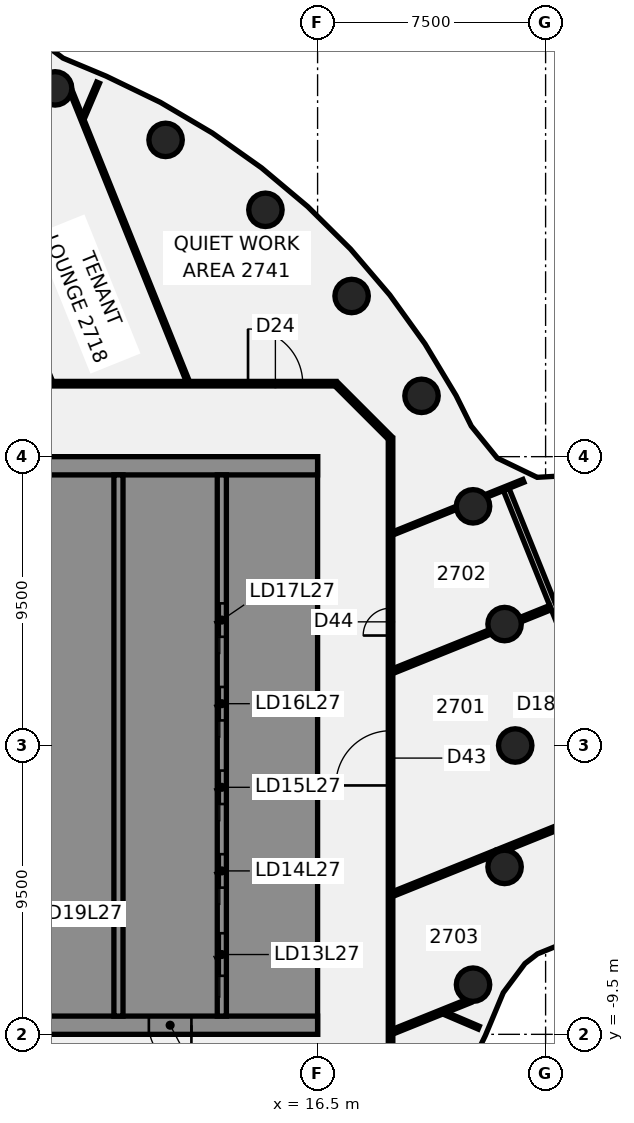
"""IFC4 building model, lengths in metres.
Left out: names, types, materials, properties, quantities, classifications, styles, units other than length and angle.
Written with IfcOpenShell. Run it as: python <this file> out.ifc"""

import sys

from ifc_helpers import new_model, si_unit, direction, frame, frame_2d, origin, origin_2d, place, context, subcontext, project, spatial, polyline, rectangle, circle, outline, extrude, element, fill, save


model = new_model("IFC4")
c1 = context("Model", 3, precision=1e-05, world=origin(), true_north=direction((0.0, 1.0)))
c2 = subcontext(c1, "Body", "Model", "MODEL_VIEW")
j1 = project(units=[si_unit("LENGTHUNIT", "METRE"), si_unit("PLANEANGLEUNIT", "RADIAN")], contexts=[c1])
p1 = place(None, origin())
s1 = spatial("IfcSite", under=j1, at=p1, CompositionType="ELEMENT")
p2 = place(p1, origin())
s2 = spatial("IfcBuilding", under=s1, at=p2, CompositionType="ELEMENT")
p3 = place(p2, frame((0.0, 0.0, 113.5)))
s3 = spatial("IfcBuildingStorey", under=s2, at=p3, CompositionType="ELEMENT", Elevation=113.5)
for number, where, z_axis, x_axis in (
    (1, (23.0, 0.0, -0.14), (0.0, 0.0, 1.0), (1.0, 0.0, 0.0)),
    (2, (22.651, 3.994, -0.14), (0.0, 0.0, 1.0), (1.0, 0.0, 0.0)),
    (3, (21.613, 7.866, -0.14), (0.0, 0.0, 1.0), (1.0, 0.0, 0.0)),
    (4, (19.919, 11.5, -0.14), (0.0, 0.0, 1.0), (1.0, 0.0, 0.0)),
    (5, (17.619, 14.784, -0.14), (0.0, 0.0, 1.0), (1.0, 0.0, 0.0)),
    (6, (14.784, 17.619, -0.14), (0.0, 0.0, 1.0), (1.0, 0.0, 0.0)),
    (7, (11.5, 19.919, -0.14), (0.0, 0.0, 1.0), (1.0, 0.0, 0.0)),
    (8, (7.866, 21.613, -0.14), (0.0, 0.0, 1.0), (1.0, 0.0, 0.0)),
    (9, (21.613, -7.866, -0.14), (0.0, 0.0, 1.0), (1.0, 0.0, 0.0)),
    (10, (22.651, -3.994, -0.14), (0.0, 0.0, 1.0), (1.0, 0.0, 0.0)),
):
    element("IfcColumn", number, at=place(p3, frame(where, z_axis=z_axis, x_axis=x_axis)), inside=s3, PredefinedType="COLUMN", context=c2, shape_type="SweptSolid", body=[
        extrude(circle(Radius=0.55, at=origin_2d()), origin(), (0.0, 0.0, 1.0), 3.75),
    ])
p4 = place(p3, frame((3.521, 22.358, 0.0), z_axis=(0.0, 0.0, 1.0), x_axis=(0.373640057319, -0.92757377473, 0.0)))
e11 = element("IfcWall", 11, at=p4, inside=s3, PredefinedType="PARTITIONING", context=c2, shape_type="SweptSolid", body=[
    extrude(rectangle(XDim=11.185, YDim=0.15, at=frame_2d((5.593, 0.0))), origin(), (0.0, 0.0, 1.0), 3.01),
])
p5 = place(p4, frame((3.3, 0.0, 0.0)))
e12 = element("IfcOpeningElement", 12, at=p5, cuts=e11, PredefinedType="OPENING", context=c2, shape_type="SweptSolid", body=[
    extrude(rectangle(XDim=1.8, YDim=2.1, at=frame_2d((0.9, 1.05))), frame((0.0, 0.085, 0.0), z_axis=(0.0, -1.0, 0.0), x_axis=(1.0, 0.0, 0.0)), (0.0, 0.0, 1.0), 0.17),
])
p6 = place(p3, frame((8.396, 21.498, 0.0), z_axis=(0.0, 0.0, 1.0), x_axis=(0.373673072067, -0.927560475232, 0.0)))
e13 = element("IfcWall", 13, at=p6, inside=s3, PredefinedType="PARTITIONING", context=c2, shape_type="SweptSolid", body=[
    extrude(rectangle(XDim=10.267, YDim=0.1, at=frame_2d((5.134, 0.0))), origin(), (0.0, 0.0, 1.0), 3.01),
])
p7 = place(p3, frame((22.704, 8.423, 0.0), z_axis=(0.0, 0.0, 1.0), x_axis=(0.373649542525, -0.927569953896, 0.0)))
e14 = element("IfcWall", 14, at=p7, inside=s3, PredefinedType="PARTITIONING", context=c2, shape_type="SweptSolid", body=[
    extrude(rectangle(XDim=14.249, YDim=0.2, at=frame_2d((7.124, 0.0))), origin(), (0.0, 0.0, 1.0), 3.01),
])
p8 = place(p7, frame((6.949, 0.0, 0.0)))
e15 = element("IfcOpeningElement", 15, at=p8, cuts=e14, PredefinedType="OPENING", context=c2, shape_type="SweptSolid", body=[
    extrude(rectangle(XDim=1.4, YDim=2.1, at=frame_2d((0.7, 1.05))), frame((0.0, 0.11, 0.0), z_axis=(0.0, -1.0, 0.0), x_axis=(1.0, 0.0, 0.0)), (0.0, 0.0, 1.0), 0.22),
])
p9 = place(p3, frame((17.128, 11.872, 0.0), z_axis=(0.0, 0.0, 1.0), x_axis=(0.707106781187, -0.707106781187, 0.0)))
e16 = element("IfcWall", 16, at=p9, inside=s3, PredefinedType="PARTITIONING", context=c2, shape_type="SweptSolid", body=[
    extrude(rectangle(XDim=2.465, YDim=0.15, at=frame_2d((1.232, 0.0))), origin(), (0.0, 0.0, 1.0), 3.01),
])
p10 = place(p3, frame((20.71, -8.816, 0.0), z_axis=(0.0, 0.0, 1.0), x_axis=(0.919900111119, -0.392152757944, 0.0)))
e17 = element("IfcWall", 17, at=p10, inside=s3, PredefinedType="PARTITIONING", context=c2, shape_type="SweptSolid", body=[
    extrude(rectangle(XDim=1.185, YDim=0.1, at=frame_2d((0.592, 0.0))), origin(), (0.0, 0.0, 1.0), 3.01),
])
p11 = place(p3, frame((-17.065, 11.9, 0.0), z_axis=(0.0, 0.0, 1.0), x_axis=(1.0, 0.0, 0.0)))
e18 = element("IfcWall", 18, at=p11, inside=s3, PredefinedType="PARTITIONING", context=c2, shape_type="SweptSolid", body=[
    extrude(rectangle(XDim=34.165, YDim=0.15, at=frame_2d((17.083, 0.0))), origin(), (0.0, 0.0, 1.0), 3.01),
])
p12 = place(p11, frame((20.168, 0.0, 0.0)))
e19 = element("IfcOpeningElement", 19, at=p12, cuts=e18, PredefinedType="OPENING", context=c2, shape_type="SweptSolid", body=[
    extrude(rectangle(XDim=1.8, YDim=2.1, at=frame_2d((0.9, 1.05))), frame((0.0, 0.085, 0.0), z_axis=(0.0, -1.0, 0.0), x_axis=(1.0, 0.0, 0.0)), (0.0, 0.0, 1.0), 0.17),
])
p13 = place(p11, frame((31.277, 0.0, 0.0)))
e20 = element("IfcOpeningElement", 20, at=p13, cuts=e18, PredefinedType="OPENING", context=c2, shape_type="SweptSolid", body=[
    extrude(rectangle(XDim=1.8, YDim=2.1, at=frame_2d((0.9, 1.05))), frame((0.0, 0.085, 0.0), z_axis=(0.0, -1.0, 0.0), x_axis=(1.0, 0.0, 0.0)), (0.0, 0.0, 1.0), 0.17),
])
p14 = place(p11, frame((5.665, 0.0, 0.0)))
e21 = element("IfcOpeningElement", 21, at=p14, cuts=e18, PredefinedType="OPENING", context=c2, shape_type="SweptSolid", body=[
    extrude(rectangle(XDim=1.8, YDim=2.1, at=frame_2d((0.9, 1.05))), frame((0.0, 0.085, 0.0), z_axis=(0.0, -1.0, 0.0), x_axis=(1.0, 0.0, 0.0)), (0.0, 0.0, 1.0), 0.17),
])
p15 = place(p3, frame((18.983, -9.408, 0.0), z_axis=(0.0, 0.0, 1.0), x_axis=(0.927604613821, 0.373563489139, 0.0)))
e22 = element("IfcWall", 22, at=p15, inside=s3, PredefinedType="PARTITIONING", context=c2, shape_type="SweptSolid", body=[
    extrude(rectangle(XDim=2.711, YDim=0.15, at=frame_2d((1.355, 0.0))), origin(), (0.0, 0.0, 1.0), 3.01),
])
p16 = place(p3, frame((18.983, -4.88, 0.0), z_axis=(0.0, 0.0, 1.0), x_axis=(0.927594907251, 0.373587590855, 0.0)))
e23 = element("IfcWall", 23, at=p16, inside=s3, PredefinedType="PARTITIONING", context=c2, shape_type="SweptSolid", body=[
    extrude(rectangle(XDim=3.639, YDim=0.15, at=frame_2d((1.819, 0.0))), origin(), (0.0, 0.0, 1.0), 3.01),
])
p17 = place(p3, frame((22.424, -3.495, 0.0), z_axis=(0.0, 0.0, 1.0), x_axis=(0.92759802507, 0.373579849412, 0.0)))
e24 = element("IfcWall", 24, at=p17, inside=s3, PredefinedType="PARTITIONING", context=c2, shape_type="SweptSolid", body=[
    extrude(rectangle(XDim=4.613, YDim=0.15, at=frame_2d((2.306, 0.0))), origin(), (0.0, 0.0, 1.0), 3.01),
])
p18 = place(p17, frame((2.4, 0.0, 0.0)))
e25 = element("IfcOpeningElement", 25, at=p18, cuts=e24, PredefinedType="OPENING", context=c2, shape_type="SweptSolid", body=[
    extrude(rectangle(XDim=0.9, YDim=2.1, at=frame_2d((0.45, 1.05))), frame((0.0, 0.085, 0.0), z_axis=(0.0, -1.0, 0.0), x_axis=(1.0, 0.0, 0.0)), (0.0, 0.0, 1.0), 0.17),
])
p19 = place(p3, frame((18.983, 2.451, 0.0), z_axis=(0.0, 0.0, 1.0), x_axis=(0.927574565159, 0.373638095047, 0.0)))
e26 = element("IfcWall", 26, at=p19, inside=s3, PredefinedType="PARTITIONING", context=c2, shape_type="SweptSolid", body=[
    extrude(rectangle(XDim=3.426, YDim=0.15, at=frame_2d((1.713, 0.0))), origin(), (0.0, 0.0, 1.0), 3.01),
])
p20 = place(p3, frame((23.172, 4.138, 0.0), z_axis=(0.0, 0.0, 1.0), x_axis=(0.927557987073, 0.37367924831, 0.0)))
e27 = element("IfcWall", 27, at=p20, inside=s3, PredefinedType="PARTITIONING", context=c2, shape_type="SweptSolid", body=[
    extrude(rectangle(XDim=1.066, YDim=0.15, at=frame_2d((0.533, 0.0))), origin(), (0.0, 0.0, 1.0), 3.01),
])
p21 = place(p3, frame((18.974, 6.975, 0.0), z_axis=(0.0, 0.0, 1.0), x_axis=(0.927638160078, 0.373480178815, 0.0)))
e28 = element("IfcWall", 28, at=p21, inside=s3, PredefinedType="PARTITIONING", context=c2, shape_type="SweptSolid", body=[
    extrude(rectangle(XDim=2.255, YDim=0.1, at=frame_2d((1.127, 0.0))), origin(), (0.0, 0.0, 1.0), 3.01),
])
p22 = place(p3, frame((22.037, 8.208, 0.0), z_axis=(0.0, 0.0, 1.0), x_axis=(0.927638560967, 0.373479183097, 0.0)))
e29 = element("IfcWall", 29, at=p22, inside=s3, PredefinedType="PARTITIONING", context=c2, shape_type="SweptSolid", body=[
    extrude(rectangle(XDim=1.33, YDim=0.1, at=frame_2d((0.665, 0.0))), origin(), (0.0, 0.0, 1.0), 3.01),
])
p23 = place(p3, frame((8.802, 20.678, 0.0), z_axis=(0.0, 0.0, 1.0), x_axis=(0.392106771025, 0.919919713951, 0.0)))
e30 = element("IfcWall", 30, at=p23, inside=s3, PredefinedType="PARTITIONING", context=c2, shape_type="SweptSolid", body=[
    extrude(rectangle(XDim=1.22, YDim=0.1, at=frame_2d((0.61, 0.0))), origin(), (0.0, 0.0, 1.0), 3.01),
])
p24 = place(p3, frame((18.9, -10.1, 0.0), z_axis=(0.0, 0.0, 1.0), x_axis=(0.0, 1.0, 0.0)))
e31 = element("IfcWall", 31, at=p24, inside=s3, PredefinedType="PARTITIONING", context=c2, shape_type="SweptSolid", body=[
    extrude(rectangle(XDim=20.2, YDim=0.15, at=frame_2d((10.1, 0.0))), origin(), (0.0, 0.0, 1.0), 3.01),
])
p25 = place(p24, frame((8.786, 0.0, 0.0)))
e32 = element("IfcOpeningElement", 32, at=p25, cuts=e31, PredefinedType="OPENING", context=c2, shape_type="SweptSolid", body=[
    extrude(rectangle(XDim=1.8, YDim=2.1, at=frame_2d((0.9, 1.05))), frame((0.0, 0.085, 0.0), z_axis=(0.0, -1.0, 0.0), x_axis=(1.0, 0.0, 0.0)), (0.0, 0.0, 1.0), 0.17),
])
p26 = place(p24, frame((13.717, 0.0, 0.0)))
e33 = element("IfcOpeningElement", 33, at=p26, cuts=e31, PredefinedType="OPENING", context=c2, shape_type="SweptSolid", body=[
    extrude(rectangle(XDim=0.9, YDim=2.1, at=frame_2d((0.45, 1.05))), frame((0.0, 0.085, 0.0), z_axis=(0.0, -1.0, 0.0), x_axis=(1.0, 0.0, 0.0)), (0.0, 0.0, 1.0), 0.17),
])
p27 = place(p3, frame((16.5, -9.2, 0.0), z_axis=(0.0, 0.0, 1.0), x_axis=(-1.0, 0.0, 0.0)))
e34 = element("IfcWall", 34, at=p27, inside=s3, PredefinedType="SHEAR", context=c2, shape_type="SweptSolid", body=[
    extrude(rectangle(XDim=13.0, YDim=0.6, at=frame_2d((6.5, 0.0))), origin(), (0.0, 0.0, 1.0), 3.61),
])
p28 = place(p27, frame((4.15, 0.0, 0.0)))
e35 = element("IfcOpeningElement", 35, at=p28, cuts=e34, PredefinedType="OPENING", context=c2, shape_type="SweptSolid", body=[
    extrude(rectangle(XDim=1.4, YDim=2.1, at=frame_2d((0.7, 1.05))), frame((0.0, 0.31, 0.0), z_axis=(0.0, -1.0, 0.0), x_axis=(1.0, 0.0, 0.0)), (0.0, 0.0, 1.0), 0.62),
])
p29 = place(p27, frame((10.125, 0.0, 0.0)))
e36 = element("IfcOpeningElement", 36, at=p29, cuts=e34, PredefinedType="OPENING", context=c2, shape_type="SweptSolid", body=[
    extrude(rectangle(XDim=1.4, YDim=2.1, at=frame_2d((0.7, 1.05))), frame((0.0, 0.31, 0.0), z_axis=(0.0, -1.0, 0.0), x_axis=(1.0, 0.0, 0.0)), (0.0, 0.0, 1.0), 0.62),
])
p30 = place(p3, origin())
e37 = element("IfcWall", 37, at=p30, inside=s3, PredefinedType="SHEAR", context=c2, shape_type="SweptSolid", body=[
    extrude(outline(polyline([(13.5, -8.9), (15.9, -8.9), (16.5, -8.9), (16.5, 8.9), (15.9, 8.9), (13.5, 8.9), (13.5, 8.125), (15.9, 8.125), (15.9, 5.625), (13.5, 5.625), (13.5, 5.375), (15.9, 5.375), (15.9, 2.875), (13.5, 2.875), (13.5, 2.625), (15.9, 2.625), (15.9, 0.125), (13.5, 0.125), (13.5, -0.125), (15.9, -0.125), (15.9, -2.625), (13.5, -2.625), (13.5, -2.875), (15.9, -2.875), (15.9, -5.375), (13.5, -5.375), (13.5, -5.625), (15.9, -5.625), (15.9, -8.125), (13.5, -8.125), (13.5, -8.9)])), origin(), (0.0, 0.0, 1.0), 3.61),
])
p31 = place(p3, frame((16.5, 9.2, 0.0), z_axis=(0.0, 0.0, 1.0), x_axis=(-1.0, 0.0, 0.0)))
e38 = element("IfcWall", 38, at=p31, inside=s3, PredefinedType="SHEAR", context=c2, shape_type="SweptSolid", body=[
    extrude(rectangle(XDim=13.0, YDim=0.6, at=frame_2d((6.5, 0.0))), origin(), (0.0, 0.0, 1.0), 3.61),
])
p32 = place(p3, origin())
e39 = element("IfcWall", 39, at=p32, inside=s3, PredefinedType="SHEAR", context=c2, shape_type="SweptSolid", body=[
    extrude(outline(polyline([(9.8, -5.375), (7.5, -5.375), (7.5, -2.875), (9.8, -2.875), (9.8, -2.625), (7.5, -2.625), (7.5, -0.125), (9.8, -0.125), (9.8, 0.125), (7.5, 0.125), (7.5, 2.625), (9.8, 2.625), (9.8, 2.875), (7.5, 2.875), (7.5, 5.375), (9.8, 5.375), (9.8, 5.625), (7.5, 5.625), (7.5, 8.125), (9.8, 8.125), (9.8, 8.9), (7.5, 8.9), (7.2, 8.9), (7.2, -5.625), (7.5, -5.625), (9.8, -5.625), (9.8, -5.375)])), origin(), (0.0, 0.0, 1.0), 3.61),
])
p33 = place(p3, origin())
e40 = element("IfcWall", 40, at=p33, inside=s3, PredefinedType="SHEAR", context=c2, shape_type="SweptSolid", body=[
    extrude(outline(polyline([(7.5, -8.125), (7.5, -8.9), (9.8, -8.9), (9.8, -8.125), (9.8, -5.625), (9.55, -5.625), (9.55, -8.125), (7.5, -8.125)])), origin(), (0.0, 0.0, 1.0), 3.61),
])
p34 = place(p3, frame((13.35, -8.9, 0.0), z_axis=(0.0, 0.0, 1.0), x_axis=(0.0, 1.0, 0.0)))
e41 = element("IfcWall", 41, at=p34, inside=s3, PredefinedType="SHEAR", context=c2, shape_type="SweptSolid", body=[
    extrude(rectangle(XDim=17.8, YDim=0.3, at=frame_2d((8.9, 0.0))), origin(), (0.0, 0.0, 1.0), 3.61),
])
p35 = place(p34, frame((1.325, 0.0, 0.0)))
e42 = element("IfcOpeningElement", 42, at=p35, cuts=e41, PredefinedType="OPENING", context=c2, shape_type="SweptSolid", body=[
    extrude(rectangle(XDim=1.4, YDim=2.1, at=frame_2d((0.7, 1.05))), frame((0.0, 0.16, 0.0), z_axis=(0.0, -1.0, 0.0), x_axis=(1.0, 0.0, 0.0)), (0.0, 0.0, 1.0), 0.32),
])
p36 = place(p34, frame((4.225, 0.0, 0.0)))
e43 = element("IfcOpeningElement", 43, at=p36, cuts=e41, PredefinedType="OPENING", context=c2, shape_type="SweptSolid", body=[
    extrude(rectangle(XDim=1.1, YDim=2.1, at=frame_2d((0.55, 1.05))), frame((0.0, 0.16, 0.0), z_axis=(0.0, -1.0, 0.0), x_axis=(1.0, 0.0, 0.0)), (0.0, 0.0, 1.0), 0.32),
])
p37 = place(p34, frame((6.975, 0.0, 0.0)))
e44 = element("IfcOpeningElement", 44, at=p37, cuts=e41, PredefinedType="OPENING", context=c2, shape_type="SweptSolid", body=[
    extrude(rectangle(XDim=1.1, YDim=2.1, at=frame_2d((0.55, 1.05))), frame((0.0, 0.16, 0.0), z_axis=(0.0, -1.0, 0.0), x_axis=(1.0, 0.0, 0.0)), (0.0, 0.0, 1.0), 0.32),
])
p38 = place(p34, frame((9.725, 0.0, 0.0)))
e45 = element("IfcOpeningElement", 45, at=p38, cuts=e41, PredefinedType="OPENING", context=c2, shape_type="SweptSolid", body=[
    extrude(rectangle(XDim=1.1, YDim=2.1, at=frame_2d((0.55, 1.05))), frame((0.0, 0.16, 0.0), z_axis=(0.0, -1.0, 0.0), x_axis=(1.0, 0.0, 0.0)), (0.0, 0.0, 1.0), 0.32),
])
p39 = place(p34, frame((12.475, 0.0, 0.0)))
e46 = element("IfcOpeningElement", 46, at=p39, cuts=e41, PredefinedType="OPENING", context=c2, shape_type="SweptSolid", body=[
    extrude(rectangle(XDim=1.1, YDim=2.1, at=frame_2d((0.55, 1.05))), frame((0.0, 0.16, 0.0), z_axis=(0.0, -1.0, 0.0), x_axis=(1.0, 0.0, 0.0)), (0.0, 0.0, 1.0), 0.32),
])
p40 = place(p3, frame((9.95, -8.9, 0.0), z_axis=(0.0, 0.0, 1.0), x_axis=(0.0, 1.0, 0.0)))
e47 = element("IfcWall", 47, at=p40, inside=s3, PredefinedType="SHEAR", context=c2, shape_type="SweptSolid", body=[
    extrude(rectangle(XDim=17.8, YDim=0.3, at=frame_2d((8.9, 0.0))), origin(), (0.0, 0.0, 1.0), 3.61),
])
p41 = place(p13, origin())
e48 = element("IfcDoor", 48, at=p41, inside=s3, OperationType="DOUBLE_DOOR_SINGLE_SWING", PredefinedType="DOOR", context=c2, shape_type="SweptSolid", body=[
    extrude(rectangle(XDim=1.8, YDim=2.1, at=frame_2d((0.9, 1.05))), frame((0.0, 0.025, 0.0), z_axis=(0.0, -1.0, 0.0), x_axis=(1.0, 0.0, 0.0)), (0.0, 0.0, 1.0), 0.05),
])
fill(e20, e48)
p42 = place(p25, origin())
e49 = element("IfcDoor", 49, at=p42, inside=s3, OperationType="DOUBLE_DOOR_SINGLE_SWING", PredefinedType="DOOR", context=c2, shape_type="SweptSolid", body=[
    extrude(rectangle(XDim=1.8, YDim=2.1, at=frame_2d((0.9, 1.05))), frame((0.0, 0.025, 0.0), z_axis=(0.0, -1.0, 0.0), x_axis=(1.0, 0.0, 0.0)), (0.0, 0.0, 1.0), 0.05),
])
fill(e32, e49)
p43 = place(p26, frame((0.9, 0.0, 0.0), z_axis=(0.0, 0.0, 1.0), x_axis=(-1.0, 0.0, 0.0)))
e50 = element("IfcDoor", 50, at=p43, inside=s3, OperationType="SINGLE_SWING_RIGHT", PredefinedType="DOOR", context=c2, shape_type="SweptSolid", body=[
    extrude(rectangle(XDim=0.9, YDim=2.1, at=frame_2d((0.45, 1.05))), frame((0.0, 0.025, 0.0), z_axis=(0.0, -1.0, 0.0), x_axis=(1.0, 0.0, 0.0)), (0.0, 0.0, 1.0), 0.05),
])
fill(e33, e50)
p44 = place(p28, origin())
e51 = element("IfcDoor", 51, at=p44, inside=s3, OperationType="SINGLE_SWING_LEFT", PredefinedType="DOOR", context=c2, shape_type="SweptSolid", body=[
    extrude(rectangle(XDim=1.4, YDim=2.1, at=frame_2d((0.7, 1.05))), frame((0.0, 0.025, 0.0), z_axis=(0.0, -1.0, 0.0), x_axis=(1.0, 0.0, 0.0)), (0.0, 0.0, 1.0), 0.05),
])
fill(e35, e51)
p45 = place(p35, origin())
e52 = element("IfcDoor", 52, at=p45, inside=s3, OperationType="SLIDING_TO_LEFT", PredefinedType="DOOR", context=c2, shape_type="SweptSolid", body=[
    extrude(rectangle(XDim=1.4, YDim=2.1, at=frame_2d((0.7, 1.05))), frame((0.0, 0.025, 0.0), z_axis=(0.0, -1.0, 0.0), x_axis=(1.0, 0.0, 0.0)), (0.0, 0.0, 1.0), 0.05),
])
fill(e42, e52)
p46 = place(p36, origin())
e53 = element("IfcDoor", 53, at=p46, inside=s3, OperationType="SLIDING_TO_LEFT", PredefinedType="DOOR", context=c2, shape_type="SweptSolid", body=[
    extrude(rectangle(XDim=1.1, YDim=2.1, at=frame_2d((0.55, 1.05))), frame((0.0, 0.025, 0.0), z_axis=(0.0, -1.0, 0.0), x_axis=(1.0, 0.0, 0.0)), (0.0, 0.0, 1.0), 0.05),
])
fill(e43, e53)
p47 = place(p37, origin())
e54 = element("IfcDoor", 54, at=p47, inside=s3, OperationType="SLIDING_TO_LEFT", PredefinedType="DOOR", context=c2, shape_type="SweptSolid", body=[
    extrude(rectangle(XDim=1.1, YDim=2.1, at=frame_2d((0.55, 1.05))), frame((0.0, 0.025, 0.0), z_axis=(0.0, -1.0, 0.0), x_axis=(1.0, 0.0, 0.0)), (0.0, 0.0, 1.0), 0.05),
])
fill(e44, e54)
p48 = place(p38, origin())
e55 = element("IfcDoor", 55, at=p48, inside=s3, OperationType="SLIDING_TO_LEFT", PredefinedType="DOOR", context=c2, shape_type="SweptSolid", body=[
    extrude(rectangle(XDim=1.1, YDim=2.1, at=frame_2d((0.55, 1.05))), frame((0.0, 0.025, 0.0), z_axis=(0.0, -1.0, 0.0), x_axis=(1.0, 0.0, 0.0)), (0.0, 0.0, 1.0), 0.05),
])
fill(e45, e55)
p49 = place(p39, origin())
e56 = element("IfcDoor", 56, at=p49, inside=s3, OperationType="SLIDING_TO_LEFT", PredefinedType="DOOR", context=c2, shape_type="SweptSolid", body=[
    extrude(rectangle(XDim=1.1, YDim=2.1, at=frame_2d((0.55, 1.05))), frame((0.0, 0.025, 0.0), z_axis=(0.0, -1.0, 0.0), x_axis=(1.0, 0.0, 0.0)), (0.0, 0.0, 1.0), 0.05),
])
fill(e46, e56)
save(model, sys.argv[1])
